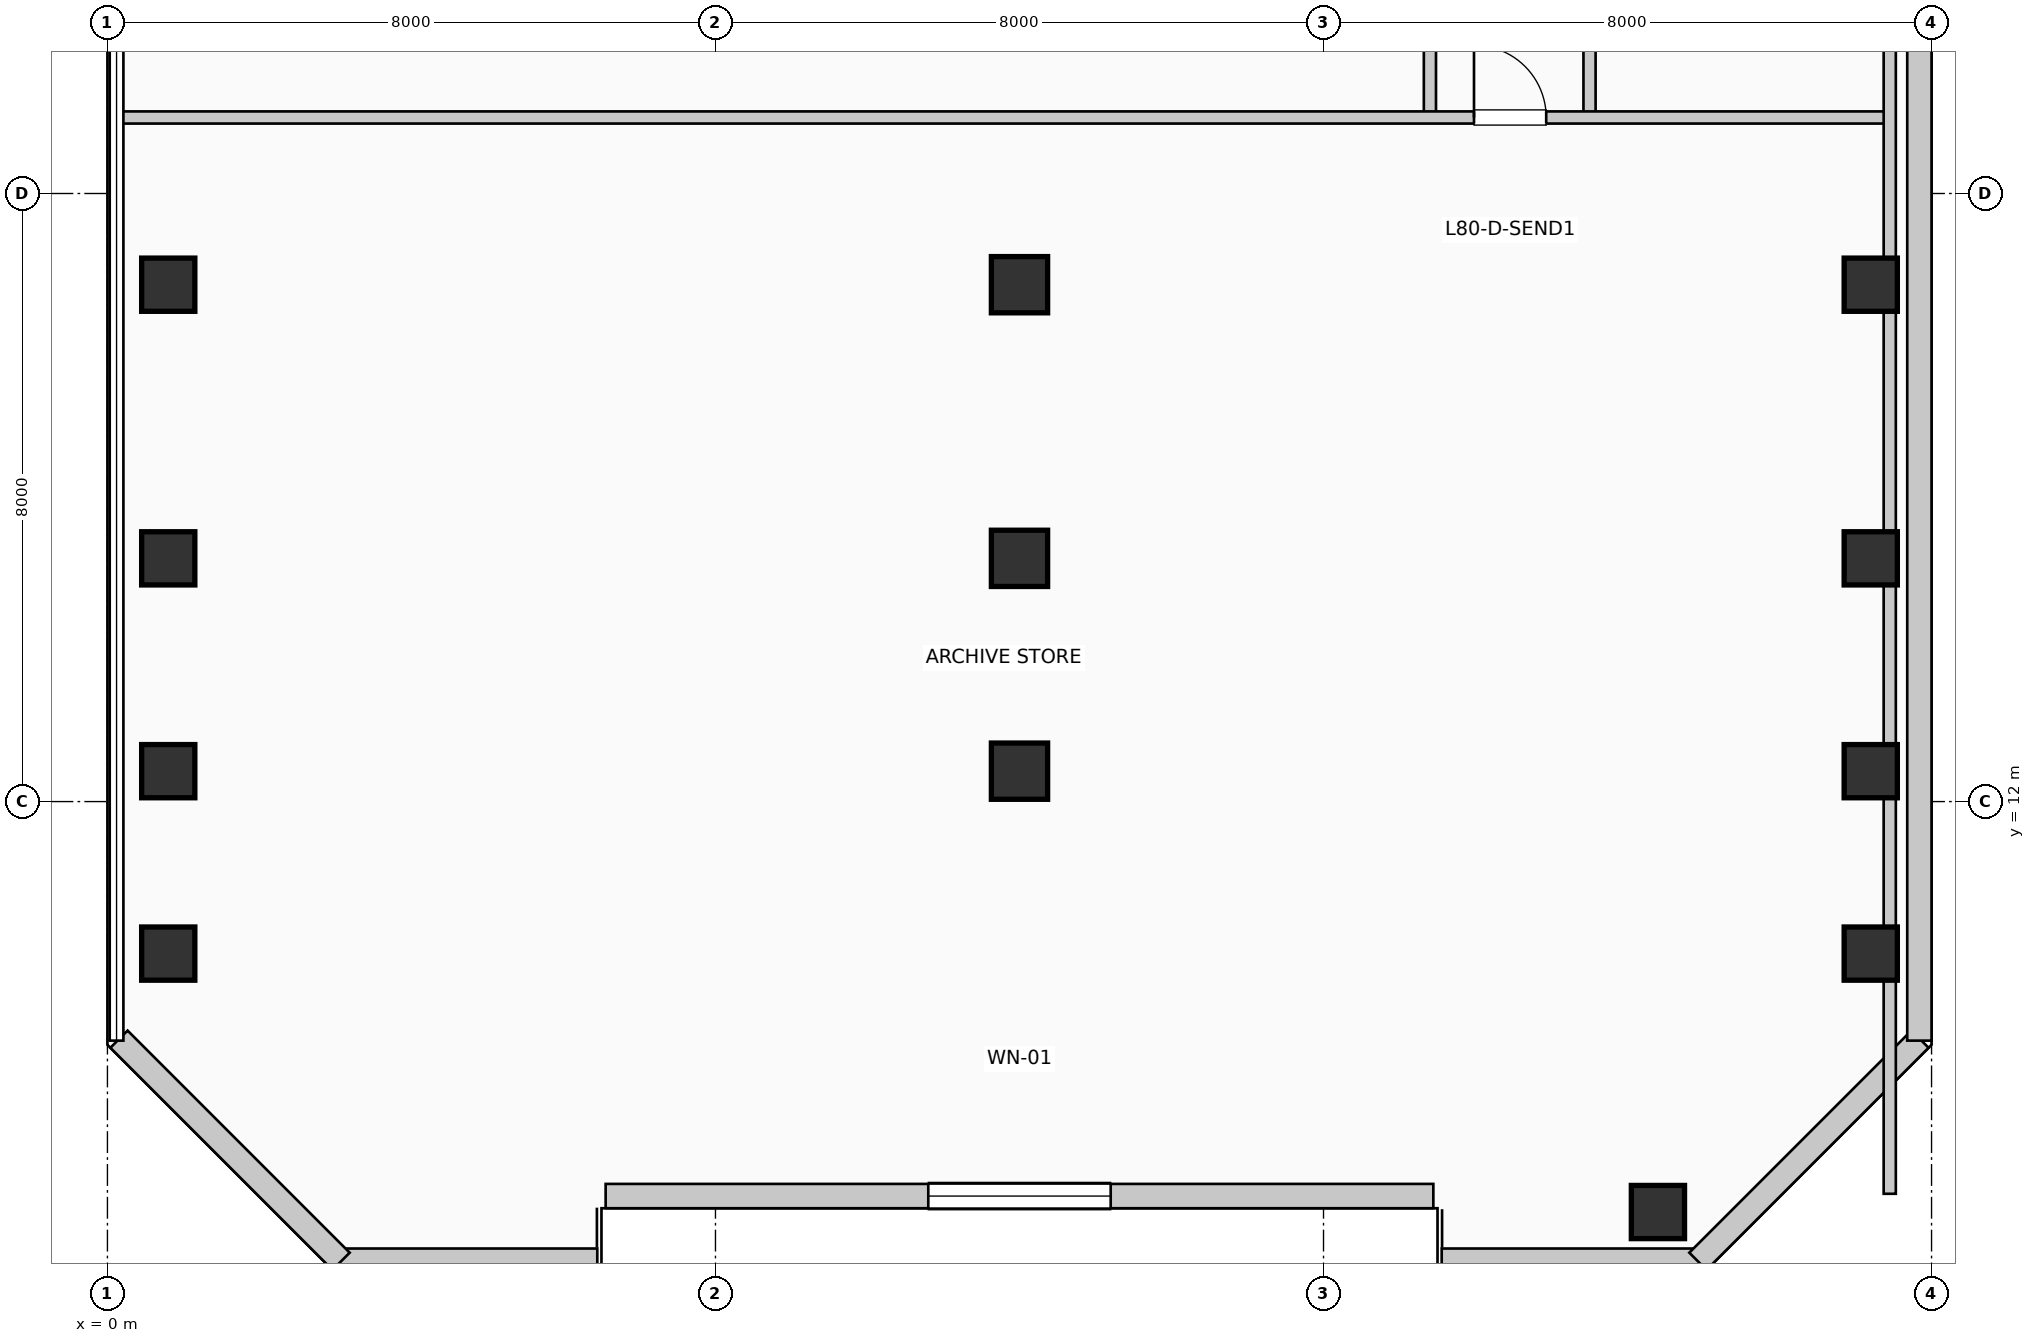
"""IFC4 building model, lengths in metres.
Left out: names, types, materials, properties, quantities, classifications, styles, units other than length and angle.
Written with IfcOpenShell. Run it as: python <this file> out.ifc"""

import sys

from ifc_helpers import new_model, si_unit, direction, frame, frame_2d, origin, origin_2d, place, context, subcontext, project, spatial, rectangle, extrude, element, fill, save


model = new_model("IFC4")
c1 = context("Model", 3, precision=1e-05, world=origin(), true_north=direction((0.0, 1.0)))
c2 = subcontext(c1, "Body", "Model", "MODEL_VIEW")
j1 = project(units=[si_unit("LENGTHUNIT", "METRE"), si_unit("PLANEANGLEUNIT", "RADIAN")], contexts=[c1])
p1 = place(None, origin())
s1 = spatial("IfcSite", under=j1, at=p1, CompositionType="ELEMENT")
p2 = place(p1, origin())
s2 = spatial("IfcBuilding", under=s1, at=p2, CompositionType="ELEMENT")
p3 = place(p2, frame((0.0, 0.0, 327.69)))
s3 = spatial("IfcBuildingStorey", under=s2, at=p3, CompositionType="ELEMENT", Elevation=327.69)
for number, where, z_axis, x_axis in (
    (1, (0.8, 10.0, 0.0), (0.0, 0.0, 1.0), (1.0, 0.0, 0.0)),
    (2, (0.8, 12.4, 0.0), (0.0, 0.0, 1.0), (1.0, 0.0, 0.0)),
    (3, (0.8, 15.2, 0.0), (0.0, 0.0, 1.0), (1.0, 0.0, 0.0)),
    (4, (0.8, 18.8, 0.0), (0.0, 0.0, 1.0), (1.0, 0.0, 0.0)),
):
    element("IfcColumn", number, at=place(p3, frame(where, z_axis=z_axis, x_axis=x_axis)), inside=s3, PredefinedType="COLUMN", context=c2, shape_type="SweptSolid", body=[
        extrude(rectangle(XDim=0.7, YDim=0.7, at=origin_2d()), origin(), (0.0, 0.0, 1.0), 3.96),
    ])
for number, where, z_axis, x_axis in (
    (5, (12.0, 12.4, 0.0), (0.0, 0.0, 1.0), (1.0, 0.0, 0.0)),
    (6, (12.0, 15.2, 0.0), (0.0, 0.0, 1.0), (1.0, 0.0, 0.0)),
    (7, (12.0, 18.8, 0.0), (0.0, 0.0, 1.0), (1.0, 0.0, 0.0)),
):
    element("IfcColumn", number, at=place(p3, frame(where, z_axis=z_axis, x_axis=x_axis)), inside=s3, PredefinedType="COLUMN", context=c2, shape_type="SweptSolid", body=[
        extrude(rectangle(XDim=0.74, YDim=0.74, at=origin_2d()), origin(), (0.0, 0.0, 1.0), 3.96),
    ])
for number, where, z_axis, x_axis in (
    (8, (20.4, 6.6, 0.0), (0.0, 0.0, 1.0), (1.0, 0.0, 0.0)),
    (9, (23.2, 10.0, 0.0), (0.0, 0.0, 1.0), (1.0, 0.0, 0.0)),
    (10, (23.2, 12.4, 0.0), (0.0, 0.0, 1.0), (1.0, 0.0, 0.0)),
    (11, (23.2, 15.2, 0.0), (0.0, 0.0, 1.0), (1.0, 0.0, 0.0)),
    (12, (23.2, 18.8, 0.0), (0.0, 0.0, 1.0), (1.0, 0.0, 0.0)),
):
    element("IfcColumn", number, at=place(p3, frame(where, z_axis=z_axis, x_axis=x_axis)), inside=s3, PredefinedType="COLUMN", context=c2, shape_type="SweptSolid", body=[
        extrude(rectangle(XDim=0.7, YDim=0.7, at=origin_2d()), origin(), (0.0, 0.0, 1.0), 3.96),
    ])
p4 = place(p3, frame((3.055, 5.96, 0.0), z_axis=(0.0, 0.0, 1.0), x_axis=(1.0, 0.0, 0.0)))
e13 = element("IfcWall", 13, at=p4, inside=s3, PredefinedType="SOLIDWALL", context=c2, shape_type="SweptSolid", body=[
    extrude(rectangle(XDim=3.39, YDim=0.32, at=frame_2d((1.695, 0.0))), origin(), (0.0, 0.0, 1.0), 3.74),
])
p5 = place(p3, frame((6.555, 6.81, 0.0), z_axis=(0.0, 0.0, 1.0), x_axis=(1.0, 0.0, 0.0)))
e14 = element("IfcWall", 14, at=p5, inside=s3, PredefinedType="SOLIDWALL", context=c2, shape_type="SweptSolid", body=[
    extrude(rectangle(XDim=10.89, YDim=0.32, at=frame_2d((5.445, 0.0))), origin(), (0.0, 0.0, 1.0), 3.74),
])
p6 = place(p5, frame((4.245, 0.0, 0.85)))
e15 = element("IfcOpeningElement", 15, at=p6, cuts=e14, PredefinedType="OPENING", context=c2, shape_type="SweptSolid", body=[
    extrude(rectangle(XDim=2.4, YDim=2.05, at=frame_2d((1.2, 1.025))), frame((0.0, 0.17, 0.0), z_axis=(0.0, -1.0, 0.0), x_axis=(1.0, 0.0, 0.0)), (0.0, 0.0, 1.0), 0.34),
])
p7 = place(p3, frame((17.555, 5.96, 0.0), z_axis=(0.0, 0.0, 1.0), x_axis=(1.0, 0.0, 0.0)))
e16 = element("IfcWall", 16, at=p7, inside=s3, PredefinedType="SOLIDWALL", context=c2, shape_type="SweptSolid", body=[
    extrude(rectangle(XDim=3.39, YDim=0.32, at=frame_2d((1.695, 0.0))), origin(), (0.0, 0.0, 1.0), 3.74),
])
p8 = place(p3, frame((20.926, 5.952, 0.0), z_axis=(0.0, 0.0, 1.0), x_axis=(0.707077242712, 0.707136318428, 0.0)))
e17 = element("IfcWall", 17, at=p8, inside=s3, PredefinedType="SOLIDWALL", context=c2, shape_type="SweptSolid", body=[
    extrude(rectangle(XDim=4.133, YDim=0.32, at=frame_2d((2.066, 0.0))), origin(), (0.0, 0.0, 1.0), 3.74),
])
p9 = place(p3, frame((23.84, 8.855, 0.0), z_axis=(0.0, 0.0, 1.0), x_axis=(0.0, 1.0, 0.0)))
e18 = element("IfcWall", 18, at=p9, inside=s3, PredefinedType="SOLIDWALL", context=c2, shape_type="SweptSolid", body=[
    extrude(rectangle(XDim=14.09, YDim=0.32, at=frame_2d((7.045, 0.0))), origin(), (0.0, 0.0, 1.0), 3.74),
])
p10 = place(p3, frame((0.152, 8.874, 0.0), z_axis=(0.0, 0.0, 1.0), x_axis=(0.707077242712, -0.707136318428, 0.0)))
e19 = element("IfcWall", 19, at=p10, inside=s3, PredefinedType="SOLIDWALL", context=c2, shape_type="SweptSolid", body=[
    extrude(rectangle(XDim=4.133, YDim=0.32, at=frame_2d((2.066, 0.0))), origin(), (0.0, 0.0, 1.0), 3.74),
])
p11 = place(p3, frame((17.4, 21.0, 0.0), z_axis=(0.0, 0.0, 1.0), x_axis=(0.0, 1.0, 0.0)))
e20 = element("IfcWall", 20, at=p11, inside=s3, PredefinedType="PARTITIONING", context=c2, shape_type="SweptSolid", body=[
    extrude(rectangle(XDim=8.4, YDim=0.16, at=frame_2d((4.2, 0.0))), origin(), (0.0, 0.0, 1.0), 3.74),
])
p12 = place(p11, frame((1.903, 0.0, 0.0), z_axis=(0.0, 0.0, 1.0), x_axis=(-1.0, 0.0, 0.0)))
e21 = element("IfcOpeningElement", 21, at=p12, cuts=e20, PredefinedType="OPENING", context=c2, shape_type="SweptSolid", body=[
    extrude(rectangle(XDim=0.95, YDim=2.15, at=frame_2d((0.475, 1.075))), frame((0.0, 0.09, 0.0), z_axis=(0.0, -1.0, 0.0), x_axis=(1.0, 0.0, 0.0)), (0.0, 0.0, 1.0), 0.18),
])
p13 = place(p11, frame((6.103, 0.0, 0.0), z_axis=(0.0, 0.0, 1.0), x_axis=(-1.0, 0.0, 0.0)))
e22 = element("IfcOpeningElement", 22, at=p13, cuts=e20, PredefinedType="OPENING", context=c2, shape_type="SweptSolid", body=[
    extrude(rectangle(XDim=0.95, YDim=2.15, at=frame_2d((0.475, 1.075))), frame((0.0, 0.09, 0.0), z_axis=(0.0, -1.0, 0.0), x_axis=(1.0, 0.0, 0.0)), (0.0, 0.0, 1.0), 0.18),
])
p14 = place(p3, frame((19.5, 21.0, 0.0), z_axis=(0.0, 0.0, 1.0), x_axis=(0.0, 1.0, 0.0)))
e23 = element("IfcWall", 23, at=p14, inside=s3, PredefinedType="PARTITIONING", context=c2, shape_type="SweptSolid", body=[
    extrude(rectangle(XDim=8.4, YDim=0.16, at=frame_2d((4.2, 0.0))), origin(), (0.0, 0.0, 1.0), 3.74),
])
p15 = place(p14, frame((3.725, 0.0, 0.0)))
e24 = element("IfcOpeningElement", 24, at=p15, cuts=e23, PredefinedType="OPENING", context=c2, shape_type="SweptSolid", body=[
    extrude(rectangle(XDim=0.95, YDim=2.15, at=frame_2d((0.475, 1.075))), frame((0.0, 0.09, 0.0), z_axis=(0.0, -1.0, 0.0), x_axis=(1.0, 0.0, 0.0)), (0.0, 0.0, 1.0), 0.18),
])
p16 = place(p3, frame((0.19, 21.0, 0.0), z_axis=(0.0, 0.0, 1.0), x_axis=(1.0, 0.0, 0.0)))
e25 = element("IfcWall", 25, at=p16, inside=s3, PredefinedType="PARTITIONING", context=c2, shape_type="SweptSolid", body=[
    extrude(rectangle(XDim=23.26, YDim=0.16, at=frame_2d((11.63, 0.0))), origin(), (0.0, 0.0, 1.0), 3.74),
])
p17 = place(p16, frame((17.79, 0.0, 0.0)))
e26 = element("IfcOpeningElement", 26, at=p17, cuts=e25, PredefinedType="OPENING", context=c2, shape_type="SweptSolid", body=[
    extrude(rectangle(XDim=0.95, YDim=2.15, at=frame_2d((0.475, 1.075))), frame((0.0, 0.09, 0.0), z_axis=(0.0, -1.0, 0.0), x_axis=(1.0, 0.0, 0.0)), (0.0, 0.0, 1.0), 0.18),
])
p18 = place(p3, frame((23.45, 6.84, 0.0), z_axis=(0.0, 0.0, 1.0), x_axis=(0.0, 1.0, 0.0)))
e27 = element("IfcWall", 27, at=p18, inside=s3, PredefinedType="PARTITIONING", context=c2, shape_type="SweptSolid", body=[
    extrude(rectangle(XDim=22.56, YDim=0.16, at=frame_2d((11.28, 0.0))), origin(), (0.0, 0.0, 1.0), 3.175),
])
p19 = place(p6, origin())
e28 = element("IfcWindow", 28, at=p19, inside=s3, PartitioningType="SINGLE_PANEL", PredefinedType="WINDOW", context=c2, shape_type="SweptSolid", body=[
    extrude(rectangle(XDim=2.4, YDim=2.05, at=frame_2d((1.2, 1.025))), frame((0.0, 0.03, 0.0), z_axis=(0.0, -1.0, 0.0), x_axis=(1.0, 0.0, 0.0)), (0.0, 0.0, 1.0), 0.06),
])
fill(e15, e28)
p20 = place(p17, origin())
e29 = element("IfcDoor", 29, at=p20, inside=s3, OperationType="SINGLE_SWING_LEFT", PredefinedType="DOOR", context=c2, shape_type="SweptSolid", body=[
    extrude(rectangle(XDim=0.95, YDim=2.15, at=frame_2d((0.475, 1.075))), frame((0.0, 0.025, 0.0), z_axis=(0.0, -1.0, 0.0), x_axis=(1.0, 0.0, 0.0)), (0.0, 0.0, 1.0), 0.05),
])
fill(e26, e29)
save(model, sys.argv[1])
